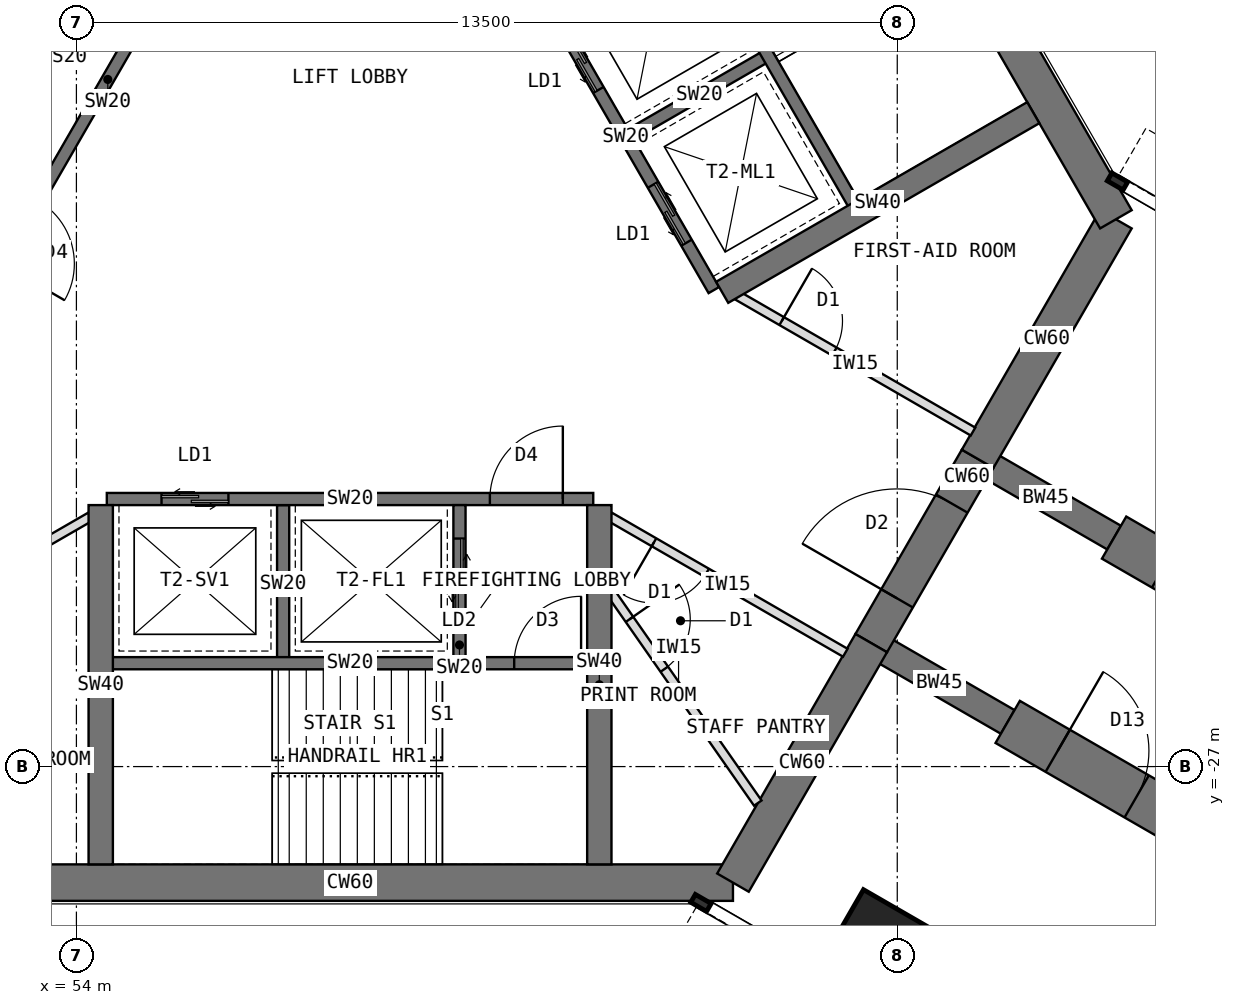
"""IFC4 building model, lengths in metres.
Left out: names, types, materials, properties, quantities, classifications, styles, units other than length and angle.
Written with IfcOpenShell. Run it as: python <this file> out.ifc"""

import sys

from ifc_helpers import new_model, si_unit, direction, frame, frame_2d, origin, origin_2d, place, context, subcontext, project, spatial, rectangle, extrude, element, fill, save


model = new_model("IFC4")
c1 = context("Model", 3, precision=1e-05, world=origin(), true_north=direction((0.0, 1.0)))
c2 = subcontext(c1, "Body", "Model", "MODEL_VIEW")
j1 = project(units=[si_unit("LENGTHUNIT", "METRE"), si_unit("PLANEANGLEUNIT", "RADIAN")], contexts=[c1])
p1 = place(None, origin())
s1 = spatial("IfcSite", under=j1, at=p1, CompositionType="ELEMENT")
p2 = place(p1, origin())
s2 = spatial("IfcBuilding", under=s1, at=p2, CompositionType="ELEMENT")
p3 = place(p2, frame((0.0, 0.0, 113.5)))
s3 = spatial("IfcBuildingStorey", under=s2, at=p3, CompositionType="ELEMENT", Elevation=113.5)
p4 = place(p3, frame((52.202, -28.908, 0.0), z_axis=(0.0, 0.0, 1.0), x_axis=(1.0, 0.0, 0.0)))
e1 = element("IfcWall", 1, at=p4, inside=s3, PredefinedType="SHEAR", context=c2, shape_type="SweptSolid", body=[
    extrude(rectangle(XDim=12.596, YDim=0.6, at=frame_2d((6.298, 0.0))), origin(), (0.0, 0.0, 1.0), 4.0),
])
p5 = place(p3, frame((64.798, -28.908, 0.0), z_axis=(0.0, 0.0, 1.0), x_axis=(0.499984222037, 0.866034513004, 0.0)))
e2 = element("IfcWall", 2, at=p5, inside=s3, PredefinedType="SHEAR", context=c2, shape_type="SweptSolid", body=[
    extrude(rectangle(XDim=4.548, YDim=0.6, at=frame_2d((2.274, 0.0))), origin(), (0.0, 0.0, 1.0), 4.0),
])
p6 = place(p3, frame((67.072, -24.97, 0.0), z_axis=(0.0, 0.0, 1.0), x_axis=(0.500010275428, 0.866019471182, 0.0)))
e3 = element("IfcWall", 3, at=p6, inside=s3, PredefinedType="SHEAR", context=c2, shape_type="SweptSolid", body=[
    extrude(rectangle(XDim=3.5, YDim=0.6, at=frame_2d((1.75, 0.0))), origin(), (0.0, 0.0, 1.0), 4.0),
])
p7 = place(p6, frame((0.85, 0.0, 0.0)))
e4 = element("IfcOpeningElement", 4, at=p7, cuts=e3, PredefinedType="OPENING", context=c2, shape_type="SweptSolid", body=[
    extrude(rectangle(XDim=1.8, YDim=2.1, at=frame_2d((0.9, 1.05))), frame((0.0, 0.31, 0.0), z_axis=(0.0, -1.0, 0.0), x_axis=(1.0, 0.0, 0.0)), (0.0, 0.0, 1.0), 0.62),
])
p8 = place(p3, frame((68.822, -21.939, 0.0), z_axis=(0.0, 0.0, 1.0), x_axis=(0.500024481964, 0.866011268655, 0.0)))
e5 = element("IfcWall", 5, at=p8, inside=s3, PredefinedType="SHEAR", context=c2, shape_type="SweptSolid", body=[
    extrude(rectangle(XDim=4.548, YDim=0.6, at=frame_2d((2.274, 0.0))), origin(), (0.0, 0.0, 1.0), 4.0),
])
p9 = place(p3, frame((71.096, -18.0, 0.0), z_axis=(0.0, 0.0, 1.0), x_axis=(-0.500005998175, 0.866021940709, 0.0)))
e6 = element("IfcWall", 6, at=p9, inside=s3, PredefinedType="SHEAR", context=c2, shape_type="SweptSolid", body=[
    extrude(rectangle(XDim=12.596, YDim=0.6, at=frame_2d((6.298, 0.0))), origin(), (0.0, 0.0, 1.0), 4.0),
])
p10 = place(p3, frame((68.822, -21.939, 0.0), z_axis=(0.0, 0.0, 1.0), x_axis=(0.866072649678, -0.499918158782, 0.0)))
e7 = element("IfcWall", 7, at=p10, inside=s3, PredefinedType="SHEAR", context=c2, shape_type="SweptSolid", body=[
    extrude(rectangle(XDim=2.592, YDim=0.45, at=frame_2d((1.296, 0.0))), origin(), (0.0, 0.0, 1.0), 4.0),
])
p11 = place(p3, frame((71.066, -23.234, 0.0), z_axis=(0.0, 0.0, 1.0), x_axis=(0.86602681393, -0.499997557548, 0.0)))
e8 = element("IfcWall", 8, at=p11, inside=s3, PredefinedType="SHEAR", context=c2, shape_type="SweptSolid", body=[
    extrude(rectangle(XDim=9.5, YDim=0.8, at=frame_2d((4.75, 0.0))), origin(), (0.0, 0.0, 1.0), 4.0),
])
p12 = place(p11, frame((0.95, 0.0, 0.0)))
e9 = element("IfcOpeningElement", 9, at=p12, cuts=e8, PredefinedType="OPENING", context=c2, shape_type="SweptSolid", body=[
    extrude(rectangle(XDim=1.5, YDim=2.1, at=frame_2d((0.75, 1.05))), frame((0.0, 0.41, 0.0), z_axis=(0.0, -1.0, 0.0), x_axis=(1.0, 0.0, 0.0)), (0.0, 0.0, 1.0), 0.82),
])
p13 = place(p3, frame((67.072, -24.97, 0.0), z_axis=(0.0, 0.0, 1.0), x_axis=(0.866031863473, -0.499988811324, 0.0)))
e10 = element("IfcWall", 10, at=p13, inside=s3, PredefinedType="SHEAR", context=c2, shape_type="SweptSolid", body=[
    extrude(rectangle(XDim=2.592, YDim=0.45, at=frame_2d((1.296, 0.0))), origin(), (0.0, 0.0, 1.0), 4.0),
])
p14 = place(p3, frame((69.316, -26.266, 0.0), z_axis=(0.0, 0.0, 1.0), x_axis=(0.86602681393, -0.499997557548, 0.0)))
e11 = element("IfcWall", 11, at=p14, inside=s3, PredefinedType="SHEAR", context=c2, shape_type="SweptSolid", body=[
    extrude(rectangle(XDim=9.5, YDim=0.8, at=frame_2d((4.75, 0.0))), origin(), (0.0, 0.0, 1.0), 4.0),
])
p15 = place(p14, frame((0.95, 0.0, 0.0)))
e12 = element("IfcOpeningElement", 12, at=p15, cuts=e11, PredefinedType="OPENING", context=c2, shape_type="SweptSolid", body=[
    extrude(rectangle(XDim=1.5, YDim=2.1, at=frame_2d((0.75, 1.05))), frame((0.0, 0.41, 0.0), z_axis=(0.0, -1.0, 0.0), x_axis=(1.0, 0.0, 0.0)), (0.0, 0.0, 1.0), 0.82),
])
p16 = place(p3, frame((67.191, -29.946, 0.0), z_axis=(0.0, 0.0, 1.0), x_axis=(0.5, 0.866025403784, 0.0)))
e13 = element("IfcColumn", 13, at=p16, inside=s3, PredefinedType="COLUMN", context=c2, shape_type="SweptSolid", body=[
    extrude(rectangle(XDim=1.35, YDim=1.35, at=origin_2d()), origin(), (0.0, 0.0, 1.0), 4.0),
])
p17 = place(p3, frame((56.516, -12.236, 0.0), z_axis=(0.0, 0.0, 1.0), x_axis=(-0.49999894854, -0.866026010844, 0.0)))
e14 = element("IfcWall", 14, at=p17, inside=s3, PredefinedType="SHEAR", context=c2, shape_type="SweptSolid", body=[
    extrude(rectangle(XDim=8.0, YDim=0.2, at=frame_2d((4.0, 0.0))), origin(), (0.0, 0.0, 1.0), 4.0),
])
p18 = place(p17, frame((6.3, 0.0, 0.0)))
e15 = element("IfcOpeningElement", 15, at=p18, cuts=e14, PredefinedType="OPENING", context=c2, shape_type="SweptSolid", body=[
    extrude(rectangle(XDim=1.2, YDim=2.1, at=frame_2d((0.6, 1.05))), frame((0.0, 0.11, 0.0), z_axis=(0.0, -1.0, 0.0), x_axis=(1.0, 0.0, 0.0)), (0.0, 0.0, 1.0), 0.22),
])
p19 = place(p3, frame((54.178, -10.886, 0.0), z_axis=(0.0, 0.0, 1.0), x_axis=(-0.49999894854, -0.866026010844, 0.0)))
e16 = element("IfcWall", 16, at=p19, inside=s3, PredefinedType="SHEAR", context=c2, shape_type="SweptSolid", body=[
    extrude(rectangle(XDim=8.0, YDim=0.2, at=frame_2d((4.0, 0.0))), origin(), (0.0, 0.0, 1.0), 4.0),
])
p20 = place(p19, frame((6.8, 0.0, 0.0)))
e17 = element("IfcOpeningElement", 17, at=p20, cuts=e16, PredefinedType="OPENING", context=c2, shape_type="SweptSolid", body=[
    extrude(rectangle(XDim=0.9, YDim=2.1, at=frame_2d((0.45, 1.05))), frame((0.0, 0.11, 0.0), z_axis=(0.0, -1.0, 0.0), x_axis=(1.0, 0.0, 0.0)), (0.0, 0.0, 1.0), 0.22),
])
p21 = place(p3, frame((54.5, -22.6, 0.0), z_axis=(0.0, 0.0, 1.0), x_axis=(1.0, 0.0, 0.0)))
e18 = element("IfcWall", 18, at=p21, inside=s3, PredefinedType="SHEAR", context=c2, shape_type="SweptSolid", body=[
    extrude(rectangle(XDim=8.0, YDim=0.2, at=frame_2d((4.0, 0.0))), origin(), (0.0, 0.0, 1.0), 4.0),
])
p22 = place(p21, frame((6.3, 0.0, 0.0)))
e19 = element("IfcOpeningElement", 19, at=p22, cuts=e18, PredefinedType="OPENING", context=c2, shape_type="SweptSolid", body=[
    extrude(rectangle(XDim=1.2, YDim=2.1, at=frame_2d((0.6, 1.05))), frame((0.0, 0.11, 0.0), z_axis=(0.0, -1.0, 0.0), x_axis=(1.0, 0.0, 0.0)), (0.0, 0.0, 1.0), 0.22),
])
p23 = place(p21, frame((0.9, 0.0, 0.0)))
e20 = element("IfcOpeningElement", 20, at=p23, cuts=e18, PredefinedType="OPENING", context=c2, shape_type="SweptSolid", body=[
    extrude(rectangle(XDim=1.1, YDim=2.2, at=frame_2d((0.55, 1.1))), frame((0.0, 0.11, 0.0), z_axis=(0.0, -1.0, 0.0), x_axis=(1.0, 0.0, 0.0)), (0.0, 0.0, 1.0), 0.22),
])
p24 = place(p3, frame((57.4, -22.7, 0.0), z_axis=(0.0, 0.0, 1.0), x_axis=(0.0, -1.0, 0.0)))
e21 = element("IfcWall", 21, at=p24, inside=s3, PredefinedType="SHEAR", context=c2, shape_type="SweptSolid", body=[
    extrude(rectangle(XDim=2.6, YDim=0.2, at=frame_2d((1.3, 0.0))), origin(), (0.0, 0.0, 1.0), 4.0),
])
p25 = place(p3, frame((60.3, -22.7, 0.0), z_axis=(0.0, 0.0, 1.0), x_axis=(0.0, -1.0, 0.0)))
e22 = element("IfcWall", 22, at=p25, inside=s3, PredefinedType="SHEAR", context=c2, shape_type="SweptSolid", body=[
    extrude(rectangle(XDim=2.6, YDim=0.2, at=frame_2d((1.3, 0.0))), origin(), (0.0, 0.0, 1.0), 4.0),
])
p26 = place(p25, frame((0.55, 0.0, 0.0)))
e23 = element("IfcOpeningElement", 23, at=p26, cuts=e22, PredefinedType="OPENING", context=c2, shape_type="SweptSolid", body=[
    extrude(rectangle(XDim=1.3, YDim=2.2, at=frame_2d((0.65, 1.1))), frame((0.0, 0.11, 0.0), z_axis=(0.0, -1.0, 0.0), x_axis=(1.0, 0.0, 0.0)), (0.0, 0.0, 1.0), 0.22),
])
p27 = place(p3, frame((54.5, -25.3, 0.0), z_axis=(0.0, 0.0, 1.0), x_axis=(1.0, 0.0, 0.0)))
e24 = element("IfcWall", 24, at=p27, inside=s3, PredefinedType="SHEAR", context=c2, shape_type="SweptSolid", body=[
    extrude(rectangle(XDim=8.0, YDim=0.2, at=frame_2d((4.0, 0.0))), origin(), (0.0, 0.0, 1.0), 4.0),
])
p28 = place(p27, frame((6.7, 0.0, 0.0)))
e25 = element("IfcOpeningElement", 25, at=p28, cuts=e24, PredefinedType="OPENING", context=c2, shape_type="SweptSolid", body=[
    extrude(rectangle(XDim=1.1, YDim=2.1, at=frame_2d((0.55, 1.05))), frame((0.0, 0.11, 0.0), z_axis=(0.0, -1.0, 0.0), x_axis=(1.0, 0.0, 0.0)), (0.0, 0.0, 1.0), 0.22),
])
for number, where, z_axis, x_axis in (
    (26, (62.6, -22.7, 0.0), (0.0, 0.0, 1.0), (0.0, -1.0, 0.0)),
    (27, (54.4, -22.7, 0.0), (0.0, 0.0, 1.0), (0.0, -1.0, 0.0)),
):
    element("IfcWall", number, at=place(p3, frame(where, z_axis=z_axis, x_axis=x_axis)), inside=s3, PredefinedType="SHEAR", context=c2, shape_type="SweptSolid", body=[
        extrude(rectangle(XDim=5.908, YDim=0.4, at=frame_2d((2.954, 0.0))), origin(), (0.0, 0.0, 1.0), 4.0),
    ])
p29 = place(p3, frame((64.484, -19.164, 0.0), z_axis=(0.0, 0.0, 1.0), x_axis=(-0.49999894854, 0.866026010844, 0.0)))
e28 = element("IfcWall", 28, at=p29, inside=s3, PredefinedType="SHEAR", context=c2, shape_type="SweptSolid", body=[
    extrude(rectangle(XDim=8.0, YDim=0.2, at=frame_2d((4.0, 0.0))), origin(), (0.0, 0.0, 1.0), 4.0),
])
p30 = place(p29, frame((6.3, 0.0, 0.0)))
e29 = element("IfcOpeningElement", 29, at=p30, cuts=e28, PredefinedType="OPENING", context=c2, shape_type="SweptSolid", body=[
    extrude(rectangle(XDim=1.2, YDim=2.1, at=frame_2d((0.6, 1.05))), frame((0.0, 0.11, 0.0), z_axis=(0.0, -1.0, 0.0), x_axis=(1.0, 0.0, 0.0)), (0.0, 0.0, 1.0), 0.22),
])
p31 = place(p29, frame((0.9, 0.0, 0.0)))
e30 = element("IfcOpeningElement", 30, at=p31, cuts=e28, PredefinedType="OPENING", context=c2, shape_type="SweptSolid", body=[
    extrude(rectangle(XDim=1.1, YDim=2.2, at=frame_2d((0.55, 1.1))), frame((0.0, 0.11, 0.0), z_axis=(0.0, -1.0, 0.0), x_axis=(1.0, 0.0, 0.0)), (0.0, 0.0, 1.0), 0.22),
])
p32 = place(p29, frame((3.8, 0.0, 0.0)))
e31 = element("IfcOpeningElement", 31, at=p32, cuts=e28, PredefinedType="OPENING", context=c2, shape_type="SweptSolid", body=[
    extrude(rectangle(XDim=1.1, YDim=2.2, at=frame_2d((0.55, 1.1))), frame((0.0, 0.11, 0.0), z_axis=(0.0, -1.0, 0.0), x_axis=(1.0, 0.0, 0.0)), (0.0, 0.0, 1.0), 0.22),
])
p33 = place(p3, frame((63.12, -16.603, 0.0), z_axis=(0.0, 0.0, 1.0), x_axis=(0.866062058628, 0.499936506574, 0.0)))
e32 = element("IfcWall", 32, at=p33, inside=s3, PredefinedType="SHEAR", context=c2, shape_type="SweptSolid", body=[
    extrude(rectangle(XDim=2.6, YDim=0.2, at=frame_2d((1.3, 0.0))), origin(), (0.0, 0.0, 1.0), 4.0),
])
p34 = place(p3, frame((66.822, -17.814, 0.0), z_axis=(0.0, 0.0, 1.0), x_axis=(-0.49999894854, 0.866026010844, 0.0)))
e33 = element("IfcWall", 33, at=p34, inside=s3, PredefinedType="SHEAR", context=c2, shape_type="SweptSolid", body=[
    extrude(rectangle(XDim=8.0, YDim=0.2, at=frame_2d((4.0, 0.0))), origin(), (0.0, 0.0, 1.0), 4.0),
])
p35 = place(p34, frame((6.7, 0.0, 0.0)))
e34 = element("IfcOpeningElement", 34, at=p35, cuts=e33, PredefinedType="OPENING", context=c2, shape_type="SweptSolid", body=[
    extrude(rectangle(XDim=1.1, YDim=2.1, at=frame_2d((0.55, 1.05))), frame((0.0, 0.11, 0.0), z_axis=(0.0, -1.0, 0.0), x_axis=(1.0, 0.0, 0.0)), (0.0, 0.0, 1.0), 0.22),
])
p36 = place(p3, frame((64.62, -19.201, 0.0), z_axis=(0.0, 0.0, 1.0), x_axis=(0.866027317282, 0.49999668571, 0.0)))
e35 = element("IfcWall", 35, at=p36, inside=s3, PredefinedType="SHEAR", context=c2, shape_type="SweptSolid", body=[
    extrude(rectangle(XDim=5.908, YDim=0.4, at=frame_2d((2.954, 0.0))), origin(), (0.0, 0.0, 1.0), 4.0),
])
p37 = place(p3, frame((64.87, -19.253, 0.0), z_axis=(0.0, 0.0, 1.0), x_axis=(0.866025707867, -0.499999473313, 0.0)))
e36 = element("IfcWall", 36, at=p37, inside=s3, PredefinedType="PARTITIONING", context=c2, shape_type="SweptSolid", body=[
    extrude(rectangle(XDim=4.476, YDim=0.15, at=frame_2d((2.238, 0.0))), origin(), (0.0, 0.0, 1.0), 3.8),
])
p38 = place(p37, frame((0.843, 0.0, 0.0)))
e37 = element("IfcOpeningElement", 37, at=p38, cuts=e36, PredefinedType="OPENING", context=c2, shape_type="SweptSolid", body=[
    extrude(rectangle(XDim=1.0, YDim=2.1, at=frame_2d((0.5, 1.05))), frame((0.0, 0.085, 0.0), z_axis=(0.0, -1.0, 0.0), x_axis=(1.0, 0.0, 0.0)), (0.0, 0.0, 1.0), 0.17),
])
p39 = place(p3, frame((66.646, -25.128, 0.0), z_axis=(0.0, 0.0, 1.0), x_axis=(-0.866025707867, 0.499999473313, 0.0)))
e38 = element("IfcWall", 38, at=p39, inside=s3, PredefinedType="PARTITIONING", context=c2, shape_type="SweptSolid", body=[
    extrude(rectangle(XDim=4.476, YDim=0.15, at=frame_2d((2.238, 0.0))), origin(), (0.0, 0.0, 1.0), 3.8),
])
p40 = place(p39, frame((2.633, 0.0, 0.0)))
e39 = element("IfcOpeningElement", 39, at=p40, cuts=e38, PredefinedType="OPENING", context=c2, shape_type="SweptSolid", body=[
    extrude(rectangle(XDim=1.0, YDim=2.1, at=frame_2d((0.5, 1.05))), frame((0.0, 0.085, 0.0), z_axis=(0.0, -1.0, 0.0), x_axis=(1.0, 0.0, 0.0)), (0.0, 0.0, 1.0), 0.17),
])
p41 = place(p3, frame((54.23, -22.89, 0.0), z_axis=(0.0, 0.0, 1.0), x_axis=(-0.866025707867, -0.499999473313, 0.0)))
e40 = element("IfcWall", 40, at=p41, inside=s3, PredefinedType="PARTITIONING", context=c2, shape_type="SweptSolid", body=[
    extrude(rectangle(XDim=4.476, YDim=0.15, at=frame_2d((2.238, 0.0))), origin(), (0.0, 0.0, 1.0), 3.8),
])
p42 = place(p41, frame((2.633, 0.0, 0.0)))
e41 = element("IfcOpeningElement", 41, at=p42, cuts=e40, PredefinedType="OPENING", context=c2, shape_type="SweptSolid", body=[
    extrude(rectangle(XDim=1.0, YDim=2.1, at=frame_2d((0.5, 1.05))), frame((0.0, 0.085, 0.0), z_axis=(0.0, -1.0, 0.0), x_axis=(1.0, 0.0, 0.0)), (0.0, 0.0, 1.0), 0.17),
])
p43 = place(p3, frame((62.6, -23.869, 0.0), z_axis=(0.0, 0.0, 1.0), x_axis=(0.572666465836, -0.819788459852, 0.0)))
e42 = element("IfcWall", 42, at=p43, inside=s3, PredefinedType="PARTITIONING", context=c2, shape_type="SweptSolid", body=[
    extrude(rectangle(XDim=4.552, YDim=0.15, at=frame_2d((2.276, 0.0))), origin(), (0.0, 0.0, 1.0), 3.8),
])
p44 = place(p43, frame((0.865, 0.0, 0.0)))
e43 = element("IfcOpeningElement", 43, at=p44, cuts=e42, PredefinedType="OPENING", context=c2, shape_type="SweptSolid", body=[
    extrude(rectangle(XDim=1.0, YDim=2.1, at=frame_2d((0.5, 1.05))), frame((0.0, 0.085, 0.0), z_axis=(0.0, -1.0, 0.0), x_axis=(1.0, 0.0, 0.0)), (0.0, 0.0, 1.0), 0.17),
])
p45 = place(p22, origin())
e44 = element("IfcDoor", 44, at=p45, inside=s3, OperationType="SINGLE_SWING_RIGHT", PredefinedType="DOOR", context=c2, shape_type="SweptSolid", body=[
    extrude(rectangle(XDim=1.2, YDim=2.1, at=frame_2d((0.6, 1.05))), frame((0.0, 0.025, 0.0), z_axis=(0.0, -1.0, 0.0), x_axis=(1.0, 0.0, 0.0)), (0.0, 0.0, 1.0), 0.05),
])
fill(e19, e44)
p46 = place(p26, origin())
e45 = element("IfcDoor", 45, at=p46, inside=s3, OperationType="DOUBLE_DOOR_SLIDING", PredefinedType="DOOR", context=c2, shape_type="SweptSolid", body=[
    extrude(rectangle(XDim=1.3, YDim=2.2, at=frame_2d((0.65, 1.1))), frame((0.0, 0.025, 0.0), z_axis=(0.0, -1.0, 0.0), x_axis=(1.0, 0.0, 0.0)), (0.0, 0.0, 1.0), 0.05),
])
fill(e23, e45)
p47 = place(p23, origin())
e46 = element("IfcDoor", 46, at=p47, inside=s3, OperationType="DOUBLE_DOOR_SLIDING", PredefinedType="DOOR", context=c2, shape_type="SweptSolid", body=[
    extrude(rectangle(XDim=1.1, YDim=2.2, at=frame_2d((0.55, 1.1))), frame((0.0, 0.025, 0.0), z_axis=(0.0, -1.0, 0.0), x_axis=(1.0, 0.0, 0.0)), (0.0, 0.0, 1.0), 0.05),
])
fill(e20, e46)
p48 = place(p28, origin())
e47 = element("IfcDoor", 47, at=p48, inside=s3, OperationType="SINGLE_SWING_RIGHT", PredefinedType="DOOR", context=c2, shape_type="SweptSolid", body=[
    extrude(rectangle(XDim=1.1, YDim=2.1, at=frame_2d((0.55, 1.05))), frame((0.0, 0.025, 0.0), z_axis=(0.0, -1.0, 0.0), x_axis=(1.0, 0.0, 0.0)), (0.0, 0.0, 1.0), 0.05),
])
fill(e25, e47)
p49 = place(p31, origin())
e48 = element("IfcDoor", 48, at=p49, inside=s3, OperationType="DOUBLE_DOOR_SLIDING", PredefinedType="DOOR", context=c2, shape_type="SweptSolid", body=[
    extrude(rectangle(XDim=1.1, YDim=2.2, at=frame_2d((0.55, 1.1))), frame((0.0, 0.025, 0.0), z_axis=(0.0, -1.0, 0.0), x_axis=(1.0, 0.0, 0.0)), (0.0, 0.0, 1.0), 0.05),
])
fill(e30, e48)
p50 = place(p32, origin())
e49 = element("IfcDoor", 49, at=p50, inside=s3, OperationType="DOUBLE_DOOR_SLIDING", PredefinedType="DOOR", context=c2, shape_type="SweptSolid", body=[
    extrude(rectangle(XDim=1.1, YDim=2.2, at=frame_2d((0.55, 1.1))), frame((0.0, 0.025, 0.0), z_axis=(0.0, -1.0, 0.0), x_axis=(1.0, 0.0, 0.0)), (0.0, 0.0, 1.0), 0.05),
])
fill(e31, e49)
p51 = place(p7, origin())
e50 = element("IfcDoor", 50, at=p51, inside=s3, OperationType="DOUBLE_DOOR_DOUBLE_SWING", PredefinedType="DOOR", context=c2, shape_type="SweptSolid", body=[
    extrude(rectangle(XDim=1.72, YDim=2.06, at=frame_2d((0.9, 1.03))), frame((0.0, 0.025, 0.0), z_axis=(0.0, -1.0, 0.0), x_axis=(1.0, 0.0, 0.0)), (0.0, 0.0, 1.0), 0.05),
    extrude(rectangle(XDim=0.04, YDim=2.1, at=frame_2d((0.02, 1.05))), frame((0.0, 0.3, 0.0), z_axis=(0.0, -1.0, 0.0), x_axis=(1.0, 0.0, 0.0)), (0.0, 0.0, 1.0), 0.6),
    extrude(rectangle(XDim=0.04, YDim=2.1, at=frame_2d((1.78, 1.05))), frame((0.0, 0.3, 0.0), z_axis=(0.0, -1.0, 0.0), x_axis=(1.0, 0.0, 0.0)), (0.0, 0.0, 1.0), 0.6),
    extrude(rectangle(XDim=1.72, YDim=0.04, at=frame_2d((0.9, 2.08))), frame((0.0, 0.3, 0.0), z_axis=(0.0, -1.0, 0.0), x_axis=(1.0, 0.0, 0.0)), (0.0, 0.0, 1.0), 0.6),
])
fill(e4, e50)
p52 = place(p44, origin())
e51 = element("IfcDoor", 51, at=p52, inside=s3, OperationType="SINGLE_SWING_LEFT", PredefinedType="DOOR", context=c2, shape_type="SweptSolid", body=[
    extrude(rectangle(XDim=1.0, YDim=2.1, at=frame_2d((0.5, 1.05))), frame((0.0, 0.025, 0.0), z_axis=(0.0, -1.0, 0.0), x_axis=(1.0, 0.0, 0.0)), (0.0, 0.0, 1.0), 0.05),
])
fill(e43, e51)
p53 = place(p40, origin())
e52 = element("IfcDoor", 52, at=p53, inside=s3, OperationType="SINGLE_SWING_RIGHT", PredefinedType="DOOR", context=c2, shape_type="SweptSolid", body=[
    extrude(rectangle(XDim=1.0, YDim=2.1, at=frame_2d((0.5, 1.05))), frame((0.0, 0.025, 0.0), z_axis=(0.0, -1.0, 0.0), x_axis=(1.0, 0.0, 0.0)), (0.0, 0.0, 1.0), 0.05),
])
fill(e39, e52)
p54 = place(p38, origin())
e53 = element("IfcDoor", 53, at=p54, inside=s3, OperationType="SINGLE_SWING_LEFT", PredefinedType="DOOR", context=c2, shape_type="SweptSolid", body=[
    extrude(rectangle(XDim=1.0, YDim=2.1, at=frame_2d((0.5, 1.05))), frame((0.0, 0.025, 0.0), z_axis=(0.0, -1.0, 0.0), x_axis=(1.0, 0.0, 0.0)), (0.0, 0.0, 1.0), 0.05),
])
fill(e37, e53)
p55 = place(p12, origin())
e54 = element("IfcDoor", 54, at=p55, inside=s3, OperationType="DOUBLE_DOOR_SINGLE_SWING", PredefinedType="DOOR", context=c2, shape_type="SweptSolid", body=[
    extrude(rectangle(XDim=1.42, YDim=2.06, at=frame_2d((0.75, 1.03))), frame((0.0, 0.025, 0.0), z_axis=(0.0, -1.0, 0.0), x_axis=(1.0, 0.0, 0.0)), (0.0, 0.0, 1.0), 0.05),
    extrude(rectangle(XDim=0.04, YDim=2.1, at=frame_2d((0.02, 1.05))), frame((0.0, 0.4, 0.0), z_axis=(0.0, -1.0, 0.0), x_axis=(1.0, 0.0, 0.0)), (0.0, 0.0, 1.0), 0.8),
    extrude(rectangle(XDim=0.04, YDim=2.1, at=frame_2d((1.48, 1.05))), frame((0.0, 0.4, 0.0), z_axis=(0.0, -1.0, 0.0), x_axis=(1.0, 0.0, 0.0)), (0.0, 0.0, 1.0), 0.8),
    extrude(rectangle(XDim=1.42, YDim=0.04, at=frame_2d((0.75, 2.08))), frame((0.0, 0.4, 0.0), z_axis=(0.0, -1.0, 0.0), x_axis=(1.0, 0.0, 0.0)), (0.0, 0.0, 1.0), 0.8),
])
fill(e9, e54)
p56 = place(p15, origin())
e55 = element("IfcDoor", 55, at=p56, inside=s3, OperationType="DOUBLE_DOOR_SINGLE_SWING", PredefinedType="DOOR", context=c2, shape_type="SweptSolid", body=[
    extrude(rectangle(XDim=1.42, YDim=2.06, at=frame_2d((0.75, 1.03))), frame((0.0, 0.025, 0.0), z_axis=(0.0, -1.0, 0.0), x_axis=(1.0, 0.0, 0.0)), (0.0, 0.0, 1.0), 0.05),
    extrude(rectangle(XDim=0.04, YDim=2.1, at=frame_2d((0.02, 1.05))), frame((0.0, 0.4, 0.0), z_axis=(0.0, -1.0, 0.0), x_axis=(1.0, 0.0, 0.0)), (0.0, 0.0, 1.0), 0.8),
    extrude(rectangle(XDim=0.04, YDim=2.1, at=frame_2d((1.48, 1.05))), frame((0.0, 0.4, 0.0), z_axis=(0.0, -1.0, 0.0), x_axis=(1.0, 0.0, 0.0)), (0.0, 0.0, 1.0), 0.8),
    extrude(rectangle(XDim=1.42, YDim=0.04, at=frame_2d((0.75, 2.08))), frame((0.0, 0.4, 0.0), z_axis=(0.0, -1.0, 0.0), x_axis=(1.0, 0.0, 0.0)), (0.0, 0.0, 1.0), 0.8),
])
fill(e12, e55)
save(model, sys.argv[1])
